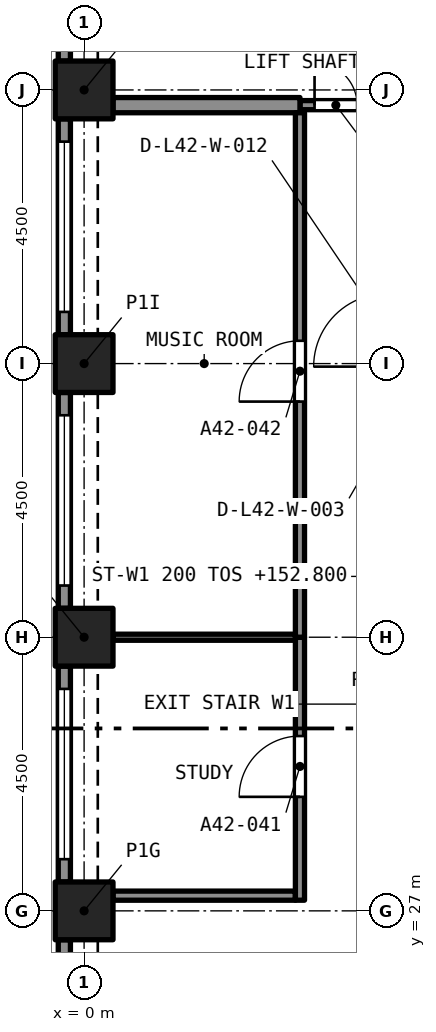
"""IFC4 building model, lengths in metres.
Left out: names, types, materials, properties, quantities, classifications, styles, units other than length and angle.
Written with IfcOpenShell. Run it as: python <this file> out.ifc"""

import sys

from ifc_helpers import new_model, si_unit, direction, frame, frame_2d, origin, origin_2d, place, context, subcontext, project, spatial, rectangle, extrude, element, fill, save


model = new_model("IFC4")
c1 = context("Model", 3, precision=1e-05, world=origin(), true_north=direction((0.0, 1.0)))
c2 = subcontext(c1, "Body", "Model", "MODEL_VIEW")
j1 = project(units=[si_unit("LENGTHUNIT", "METRE"), si_unit("PLANEANGLEUNIT", "RADIAN")], contexts=[c1])
p1 = place(None, origin())
s1 = spatial("IfcSite", under=j1, at=p1, CompositionType="ELEMENT")
p2 = place(p1, origin())
s2 = spatial("IfcBuilding", under=s1, at=p2, CompositionType="ELEMENT")
p3 = place(p2, frame((0.0, 0.0, 150.6)))
s3 = spatial("IfcBuildingStorey", under=s2, at=p3, CompositionType="ELEMENT", Elevation=150.6)
for number, where, z_axis, x_axis in (
    (1, (0.0, 27.0, 0.0), (0.0, 0.0, 1.0), (1.0, 0.0, 0.0)),
    (2, (0.0, 31.5, 0.0), (0.0, 0.0, 1.0), (1.0, 0.0, 0.0)),
    (3, (0.0, 36.0, 0.0), (0.0, 0.0, 1.0), (1.0, 0.0, 0.0)),
    (4, (0.0, 40.5, 0.0), (0.0, 0.0, 1.0), (1.0, 0.0, 0.0)),
):
    element("IfcColumn", number, at=place(p3, frame(where, z_axis=z_axis, x_axis=x_axis)), inside=s3, PredefinedType="COLUMN", context=c2, shape_type="SweptSolid", body=[
        extrude(rectangle(XDim=0.95, YDim=0.95, at=origin_2d()), origin(), (0.0, 0.0, 1.0), 4.4),
    ])
p4 = place(p3, frame((-0.325, 40.975, 0.0), z_axis=(0.0, 0.0, 1.0), x_axis=(0.0, 1.0, 0.0)))
e5 = element("IfcWall", 5, at=p4, inside=s3, PredefinedType="SOLIDWALL", context=c2, shape_type="SweptSolid", body=[
    extrude(rectangle(XDim=3.55, YDim=0.2, at=frame_2d((1.775, 0.0))), origin(), (0.0, 0.0, 1.0), 4.4),
])
p5 = place(p4, frame((0.375, 0.0, 0.45)))
e6 = element("IfcOpeningElement", 6, at=p5, cuts=e5, PredefinedType="OPENING", context=c2, shape_type="SweptSolid", body=[
    extrude(rectangle(XDim=2.8, YDim=2.55, at=frame_2d((1.4, 1.275))), frame((0.0, 0.11, 0.0), z_axis=(0.0, -1.0, 0.0), x_axis=(1.0, 0.0, 0.0)), (0.0, 0.0, 1.0), 0.22),
])
p6 = place(p3, frame((-0.325, 36.475, 0.0), z_axis=(0.0, 0.0, 1.0), x_axis=(0.0, 1.0, 0.0)))
e7 = element("IfcWall", 7, at=p6, inside=s3, PredefinedType="SOLIDWALL", context=c2, shape_type="SweptSolid", body=[
    extrude(rectangle(XDim=3.55, YDim=0.2, at=frame_2d((1.775, 0.0))), origin(), (0.0, 0.0, 1.0), 4.4),
])
p7 = place(p6, frame((0.375, 0.0, 0.45)))
e8 = element("IfcOpeningElement", 8, at=p7, cuts=e7, PredefinedType="OPENING", context=c2, shape_type="SweptSolid", body=[
    extrude(rectangle(XDim=2.8, YDim=2.55, at=frame_2d((1.4, 1.275))), frame((0.0, 0.11, 0.0), z_axis=(0.0, -1.0, 0.0), x_axis=(1.0, 0.0, 0.0)), (0.0, 0.0, 1.0), 0.22),
])
p8 = place(p3, frame((-0.325, 31.975, 0.0), z_axis=(0.0, 0.0, 1.0), x_axis=(0.0, 1.0, 0.0)))
e9 = element("IfcWall", 9, at=p8, inside=s3, PredefinedType="SOLIDWALL", context=c2, shape_type="SweptSolid", body=[
    extrude(rectangle(XDim=3.55, YDim=0.2, at=frame_2d((1.775, 0.0))), origin(), (0.0, 0.0, 1.0), 4.4),
])
p9 = place(p8, frame((0.375, 0.0, 0.45)))
e10 = element("IfcOpeningElement", 10, at=p9, cuts=e9, PredefinedType="OPENING", context=c2, shape_type="SweptSolid", body=[
    extrude(rectangle(XDim=2.8, YDim=2.55, at=frame_2d((1.4, 1.275))), frame((0.0, 0.11, 0.0), z_axis=(0.0, -1.0, 0.0), x_axis=(1.0, 0.0, 0.0)), (0.0, 0.0, 1.0), 0.22),
])
p10 = place(p3, frame((-0.325, 27.475, 0.0), z_axis=(0.0, 0.0, 1.0), x_axis=(0.0, 1.0, 0.0)))
e11 = element("IfcWall", 11, at=p10, inside=s3, PredefinedType="SOLIDWALL", context=c2, shape_type="SweptSolid", body=[
    extrude(rectangle(XDim=3.55, YDim=0.2, at=frame_2d((1.775, 0.0))), origin(), (0.0, 0.0, 1.0), 4.4),
])
p11 = place(p10, frame((0.375, 0.0, 0.45)))
e12 = element("IfcOpeningElement", 12, at=p11, cuts=e11, PredefinedType="OPENING", context=c2, shape_type="SweptSolid", body=[
    extrude(rectangle(XDim=2.8, YDim=2.55, at=frame_2d((1.4, 1.275))), frame((0.0, 0.11, 0.0), z_axis=(0.0, -1.0, 0.0), x_axis=(1.0, 0.0, 0.0)), (0.0, 0.0, 1.0), 0.22),
])
p12 = place(p3, frame((-0.325, 22.975, 0.0), z_axis=(0.0, 0.0, 1.0), x_axis=(0.0, 1.0, 0.0)))
e13 = element("IfcWall", 13, at=p12, inside=s3, PredefinedType="SOLIDWALL", context=c2, shape_type="SweptSolid", body=[
    extrude(rectangle(XDim=3.55, YDim=0.2, at=frame_2d((1.775, 0.0))), origin(), (0.0, 0.0, 1.0), 4.4),
])
p13 = place(p12, frame((0.375, 0.0, 0.45)))
e14 = element("IfcOpeningElement", 14, at=p13, cuts=e13, PredefinedType="OPENING", context=c2, shape_type="SweptSolid", body=[
    extrude(rectangle(XDim=2.8, YDim=2.55, at=frame_2d((1.4, 1.275))), frame((0.0, 0.11, 0.0), z_axis=(0.0, -1.0, 0.0), x_axis=(1.0, 0.0, 0.0)), (0.0, 0.0, 1.0), 0.22),
])
p14 = place(p3, frame((3.55, 40.25, 0.0), z_axis=(0.0, 0.0, 1.0), x_axis=(1.0, 0.0, 0.0)))
e15 = element("IfcWall", 15, at=p14, inside=s3, PredefinedType="PARTITIONING", context=c2, shape_type="SweptSolid", body=[
    extrude(rectangle(XDim=1.2, YDim=0.15, at=frame_2d((0.6, 0.0))), origin(), (0.0, 0.0, 1.0), 4.1),
])
p15 = place(p14, frame((0.24, 0.0, 0.0)))
e16 = element("IfcOpeningElement", 16, at=p15, cuts=e15, PredefinedType="OPENING", context=c2, shape_type="SweptSolid", body=[
    extrude(rectangle(XDim=0.7, YDim=2.1, at=frame_2d((0.35, 1.05))), frame((0.0, 0.085, 0.0), z_axis=(0.0, -1.0, 0.0), x_axis=(1.0, 0.0, 0.0)), (0.0, 0.0, 1.0), 0.17),
])
p16 = place(p3, frame((0.475, 40.25, 0.0), z_axis=(0.0, 0.0, 1.0), x_axis=(1.0, 0.0, 0.0)))
e17 = element("IfcWall", 17, at=p16, inside=s3, PredefinedType="PARTITIONING", context=c2, shape_type="SweptSolid", body=[
    extrude(rectangle(XDim=3.075, YDim=0.25, at=frame_2d((1.538, 0.0))), origin(), (0.0, 0.0, 1.0), 4.1),
])
p17 = place(p3, frame((0.475, 27.25, 0.0), z_axis=(0.0, 0.0, 1.0), x_axis=(1.0, 0.0, 0.0)))
e18 = element("IfcWall", 18, at=p17, inside=s3, PredefinedType="PARTITIONING", context=c2, shape_type="SweptSolid", body=[
    extrude(rectangle(XDim=3.0, YDim=0.15, at=frame_2d((1.5, 0.0))), origin(), (0.0, 0.0, 1.0), 4.1),
])
p18 = place(p3, frame((3.55, 27.175, 0.0), z_axis=(0.0, 0.0, 1.0), x_axis=(0.0, 1.0, 0.0)))
e19 = element("IfcWall", 19, at=p18, inside=s3, PredefinedType="PARTITIONING", context=c2, shape_type="SweptSolid", body=[
    extrude(rectangle(XDim=4.325, YDim=0.15, at=frame_2d((2.163, 0.0))), origin(), (0.0, 0.0, 1.0), 4.1),
])
p19 = place(p18, frame((1.7, 0.0, 0.0)))
e20 = element("IfcOpeningElement", 20, at=p19, cuts=e19, PredefinedType="OPENING", context=c2, shape_type="SweptSolid", body=[
    extrude(rectangle(XDim=1.0, YDim=2.1, at=frame_2d((0.5, 1.05))), frame((0.0, 0.085, 0.0), z_axis=(0.0, -1.0, 0.0), x_axis=(1.0, 0.0, 0.0)), (0.0, 0.0, 1.0), 0.17),
])
p20 = place(p3, frame((3.55, 31.5, 0.0), z_axis=(0.0, 0.0, 1.0), x_axis=(0.0, 1.0, 0.0)))
e21 = element("IfcWall", 21, at=p20, inside=s3, PredefinedType="PARTITIONING", context=c2, shape_type="SweptSolid", body=[
    extrude(rectangle(XDim=8.625, YDim=0.15, at=frame_2d((4.312, 0.0))), origin(), (0.0, 0.0, 1.0), 4.1),
])
p21 = place(p20, frame((3.875, 0.0, 0.0)))
e22 = element("IfcOpeningElement", 22, at=p21, cuts=e21, PredefinedType="OPENING", context=c2, shape_type="SweptSolid", body=[
    extrude(rectangle(XDim=1.0, YDim=2.1, at=frame_2d((0.5, 1.05))), frame((0.0, 0.085, 0.0), z_axis=(0.0, -1.0, 0.0), x_axis=(1.0, 0.0, 0.0)), (0.0, 0.0, 1.0), 0.17),
])
p22 = place(p3, frame((0.475, 31.5, 0.0), z_axis=(0.0, 0.0, 1.0), x_axis=(1.0, 0.0, 0.0)))
e23 = element("IfcWall", 23, at=p22, inside=s3, PredefinedType="PARTITIONING", context=c2, shape_type="SweptSolid", body=[
    extrude(rectangle(XDim=3.0, YDim=0.1, at=frame_2d((1.5, 0.0))), origin(), (0.0, 0.0, 1.0), 4.1),
])
p23 = place(p7, origin())
e24 = element("IfcWindow", 24, at=p23, inside=s3, PartitioningType="SINGLE_PANEL", PredefinedType="WINDOW", context=c2, shape_type="SweptSolid", body=[
    extrude(rectangle(XDim=2.8, YDim=2.55, at=frame_2d((1.4, 1.275))), frame((0.0, 0.03, 0.0), z_axis=(0.0, -1.0, 0.0), x_axis=(1.0, 0.0, 0.0)), (0.0, 0.0, 1.0), 0.06),
])
fill(e8, e24)
p24 = place(p9, origin())
e25 = element("IfcWindow", 25, at=p24, inside=s3, PartitioningType="SINGLE_PANEL", PredefinedType="WINDOW", context=c2, shape_type="SweptSolid", body=[
    extrude(rectangle(XDim=2.8, YDim=2.55, at=frame_2d((1.4, 1.275))), frame((0.0, 0.03, 0.0), z_axis=(0.0, -1.0, 0.0), x_axis=(1.0, 0.0, 0.0)), (0.0, 0.0, 1.0), 0.06),
])
fill(e10, e25)
p25 = place(p11, origin())
e26 = element("IfcWindow", 26, at=p25, inside=s3, PartitioningType="SINGLE_PANEL", PredefinedType="WINDOW", context=c2, shape_type="SweptSolid", body=[
    extrude(rectangle(XDim=2.8, YDim=2.55, at=frame_2d((1.4, 1.275))), frame((0.0, 0.03, 0.0), z_axis=(0.0, -1.0, 0.0), x_axis=(1.0, 0.0, 0.0)), (0.0, 0.0, 1.0), 0.06),
])
fill(e12, e26)
p26 = place(p15, origin())
e27 = element("IfcDoor", 27, at=p26, inside=s3, OperationType="SINGLE_SWING_LEFT", PredefinedType="DOOR", context=c2, shape_type="SweptSolid", body=[
    extrude(rectangle(XDim=0.7, YDim=2.1, at=frame_2d((0.35, 1.05))), frame((0.0, 0.025, 0.0), z_axis=(0.0, -1.0, 0.0), x_axis=(1.0, 0.0, 0.0)), (0.0, 0.0, 1.0), 0.05),
])
fill(e16, e27)
p27 = place(p19, origin())
e28 = element("IfcDoor", 28, at=p27, inside=s3, OperationType="SINGLE_SWING_RIGHT", PredefinedType="DOOR", context=c2, shape_type="SweptSolid", body=[
    extrude(rectangle(XDim=1.0, YDim=2.1, at=frame_2d((0.5, 1.05))), frame((0.0, 0.025, 0.0), z_axis=(0.0, -1.0, 0.0), x_axis=(1.0, 0.0, 0.0)), (0.0, 0.0, 1.0), 0.05),
])
fill(e20, e28)
p28 = place(p21, origin())
e29 = element("IfcDoor", 29, at=p28, inside=s3, OperationType="SINGLE_SWING_RIGHT", PredefinedType="DOOR", context=c2, shape_type="SweptSolid", body=[
    extrude(rectangle(XDim=1.0, YDim=2.1, at=frame_2d((0.5, 1.05))), frame((0.0, 0.025, 0.0), z_axis=(0.0, -1.0, 0.0), x_axis=(1.0, 0.0, 0.0)), (0.0, 0.0, 1.0), 0.05),
])
fill(e22, e29)
save(model, sys.argv[1])
